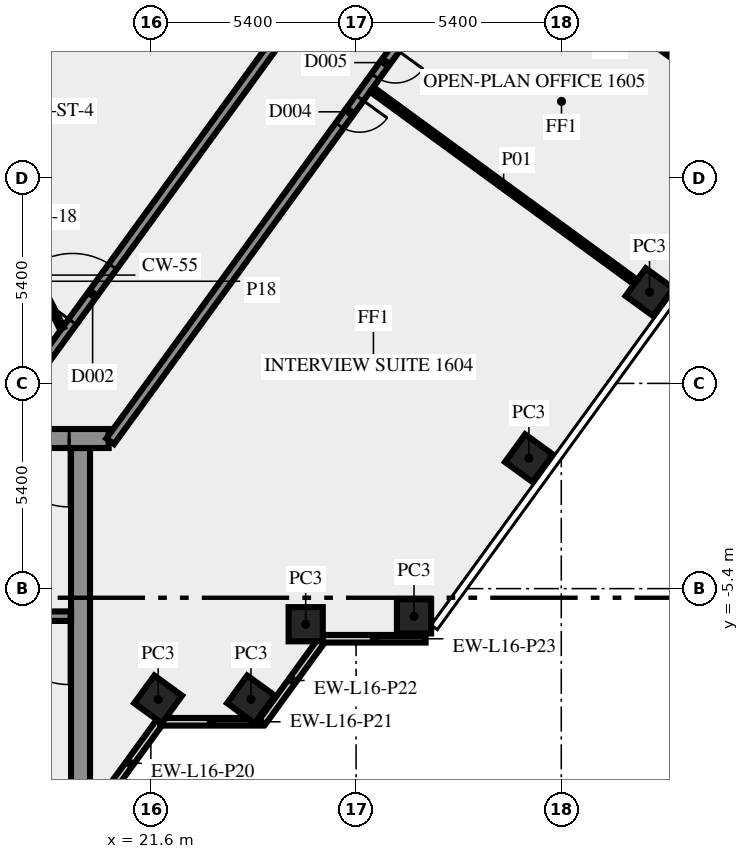
"""IFC4 building model, lengths in metres.
Left out: names, types, materials, properties, quantities, classifications, styles, units other than length and angle.
Written with IfcOpenShell. Run it as: python <this file> out.ifc"""

import sys

from ifc_helpers import new_model, si_unit, direction, frame, frame_2d, origin, origin_2d, place, context, subcontext, project, spatial, rectangle, extrude, element, fill, save


model = new_model("IFC4")
c1 = context("Model", 3, precision=1e-05, world=origin(), true_north=direction((0.0, 1.0)))
c2 = subcontext(c1, "Body", "Model", "MODEL_VIEW")
j1 = project(units=[si_unit("LENGTHUNIT", "METRE"), si_unit("PLANEANGLEUNIT", "RADIAN")], contexts=[c1])
p1 = place(None, origin())
s1 = spatial("IfcSite", under=j1, at=p1, CompositionType="ELEMENT")
p2 = place(p1, origin())
s2 = spatial("IfcBuilding", under=s1, at=p2, CompositionType="ELEMENT")
p3 = place(p2, frame((0.0, 0.0, 71.0)))
s3 = spatial("IfcBuildingStorey", under=s2, at=p3, CompositionType="ELEMENT", Elevation=71.0)
for number, where, z_axis, x_axis in (
    (1, (21.792, -8.315, 0.0), (0.0, 0.0, 1.0), (0.588, 0.809, 0.0)),
    (2, (24.235, -8.315, 0.0), (0.0, 0.0, 1.0), (0.588, 0.809, 0.0)),
    (3, (25.674, -6.337, 0.0), (0.0, 0.0, 1.0), (1.0, 0.0, 0.0)),
    (4, (28.525, -6.13, 0.0), (0.0, 0.0, 1.0), (1.0, 0.0, 0.0)),
    (5, (31.548, -1.969, 0.0), (0.0, 0.0, 1.0), (0.588, 0.809, 0.0)),
    (6, (34.722, 2.4, 0.0), (0.0, 0.0, 1.0), (0.588, 0.809, 0.0)),
):
    element("IfcColumn", number, at=place(p3, frame(where, z_axis=z_axis, x_axis=x_axis)), inside=s3, PredefinedType="COLUMN", context=c2, shape_type="SweptSolid", body=[
        extrude(rectangle(XDim=0.9, YDim=0.9, at=origin_2d()), origin(), (0.0, 0.0, 1.0), 3.65),
    ])
p4 = place(p3, frame((20.253, -11.083, 0.0), z_axis=(0.0, 0.0, 1.0), x_axis=(0.587766567315, 0.809030569476, 0.0)))
e7 = element("IfcWall", 7, at=p4, inside=s3, PredefinedType="SOLIDWALL", context=c2, shape_type="SweptSolid", body=[
    extrude(rectangle(XDim=2.688, YDim=0.2, at=frame_2d((1.344, 0.0))), origin(), (0.0, 0.0, 1.0), 3.65),
])
p5 = place(p3, frame((21.843, -8.904, 0.0), z_axis=(0.0, 0.0, 1.0), x_axis=(1.0, 0.0, 0.0)))
e8 = element("IfcWall", 8, at=p5, inside=s3, PredefinedType="SOLIDWALL", context=c2, shape_type="SweptSolid", body=[
    extrude(rectangle(XDim=2.7, YDim=0.2, at=frame_2d((1.35, 0.0))), origin(), (0.0, 0.0, 1.0), 3.65),
])
p6 = place(p3, frame((24.533, -8.909, 0.0), z_axis=(0.0, 0.0, 1.0), x_axis=(0.587720002413, 0.809064397168, 0.0)))
e9 = element("IfcWall", 9, at=p6, inside=s3, PredefinedType="SOLIDWALL", context=c2, shape_type="SweptSolid", body=[
    extrude(rectangle(XDim=2.7, YDim=0.2, at=frame_2d((1.35, 0.0))), origin(), (0.0, 0.0, 1.0), 3.65),
])
p7 = place(p3, frame((26.13, -6.719, 0.0), z_axis=(0.0, 0.0, 1.0), x_axis=(1.0, 0.0, 0.0)))
e10 = element("IfcWall", 10, at=p7, inside=s3, PredefinedType="SOLIDWALL", context=c2, shape_type="SweptSolid", body=[
    extrude(rectangle(XDim=2.7, YDim=0.2, at=frame_2d((1.35, 0.0))), origin(), (0.0, 0.0, 1.0), 3.65),
])
p8 = place(p3, frame((19.75, -10.5, 0.0), z_axis=(0.0, 0.0, 1.0), x_axis=(0.0, 1.0, 0.0)))
e11 = element("IfcWall", 11, at=p8, inside=s3, PredefinedType="SHEAR", context=c2, shape_type="SweptSolid", body=[
    extrude(rectangle(XDim=8.8, YDim=0.5, at=frame_2d((4.4, 0.0))), origin(), (0.0, 0.0, 1.0), 3.65),
])
p9 = place(p3, frame((19.5, -6.125, 0.0), z_axis=(0.0, 0.0, 1.0), x_axis=(-1.0, 0.0, 0.0)))
e12 = element("IfcWall", 12, at=p9, inside=s3, PredefinedType="SHEAR", context=c2, shape_type="SweptSolid", body=[
    extrude(rectangle(XDim=8.05, YDim=0.25, at=frame_2d((4.025, 0.0))), origin(), (0.0, 0.0, 1.0), 3.65),
])
p10 = place(p9, frame((0.05, 0.0, 0.0)))
e13 = element("IfcOpeningElement", 13, at=p10, cuts=e12, PredefinedType="OPENING", context=c2, shape_type="SweptSolid", body=[
    extrude(rectangle(XDim=1.8, YDim=2.1, at=frame_2d((0.9, 1.05))), frame((0.0, 0.135, 0.0), z_axis=(0.0, -1.0, 0.0), x_axis=(1.0, 0.0, 0.0)), (0.0, 0.0, 1.0), 0.27),
])
p11 = place(p3, frame((20.49, -1.45, 0.0), z_axis=(0.0, 0.0, 1.0), x_axis=(-1.0, 0.0, 0.0)))
e14 = element("IfcWall", 14, at=p11, inside=s3, PredefinedType="SHEAR", context=c2, shape_type="SweptSolid", body=[
    extrude(rectangle(XDim=40.98, YDim=0.5, at=frame_2d((20.49, 0.0))), origin(), (0.0, 0.0, 1.0), 3.65),
])
p12 = place(p11, frame((38.14, 0.0, 0.0)))
e15 = element("IfcOpeningElement", 15, at=p12, cuts=e14, PredefinedType="OPENING", context=c2, shape_type="SweptSolid", body=[
    extrude(rectangle(XDim=1.8, YDim=2.1, at=frame_2d((0.9, 1.05))), frame((0.0, 0.26, 0.0), z_axis=(0.0, -1.0, 0.0), x_axis=(1.0, 0.0, 0.0)), (0.0, 0.0, 1.0), 0.52),
])
p13 = place(p11, frame((35.89, 0.0, 0.0)))
e16 = element("IfcOpeningElement", 16, at=p13, cuts=e14, PredefinedType="OPENING", context=c2, shape_type="SweptSolid", body=[
    extrude(rectangle(XDim=0.9, YDim=2.1, at=frame_2d((0.45, 1.05))), frame((0.0, 0.26, 0.0), z_axis=(0.0, -1.0, 0.0), x_axis=(1.0, 0.0, 0.0)), (0.0, 0.0, 1.0), 0.52),
])
p14 = place(p11, frame((32.94, 0.0, 0.0)))
e17 = element("IfcOpeningElement", 17, at=p14, cuts=e14, PredefinedType="OPENING", context=c2, shape_type="SweptSolid", body=[
    extrude(rectangle(XDim=0.9, YDim=2.1, at=frame_2d((0.45, 1.05))), frame((0.0, 0.26, 0.0), z_axis=(0.0, -1.0, 0.0), x_axis=(1.0, 0.0, 0.0)), (0.0, 0.0, 1.0), 0.52),
])
p15 = place(p11, frame((21.765, 0.0, 0.0)))
e18 = element("IfcOpeningElement", 18, at=p15, cuts=e14, PredefinedType="OPENING", context=c2, shape_type="SweptSolid", body=[
    extrude(rectangle(XDim=2.0, YDim=2.1, at=frame_2d((1.0, 1.05))), frame((0.0, 0.26, 0.0), z_axis=(0.0, -1.0, 0.0), x_axis=(1.0, 0.0, 0.0)), (0.0, 0.0, 1.0), 0.52),
])
p16 = place(p11, frame((7.14, 0.0, 0.0)))
e19 = element("IfcOpeningElement", 19, at=p16, cuts=e14, PredefinedType="OPENING", context=c2, shape_type="SweptSolid", body=[
    extrude(rectangle(XDim=0.9, YDim=2.1, at=frame_2d((0.45, 1.05))), frame((0.0, 0.26, 0.0), z_axis=(0.0, -1.0, 0.0), x_axis=(1.0, 0.0, 0.0)), (0.0, 0.0, 1.0), 0.52),
])
p17 = place(p11, frame((5.028, 0.0, 0.0)))
e20 = element("IfcOpeningElement", 20, at=p17, cuts=e14, PredefinedType="OPENING", context=c2, shape_type="SweptSolid", body=[
    extrude(rectangle(XDim=0.8, YDim=2.1, at=frame_2d((0.4, 1.05))), frame((0.0, 0.26, 0.0), z_axis=(0.0, -1.0, 0.0), x_axis=(1.0, 0.0, 0.0)), (0.0, 0.0, 1.0), 0.52),
])
p18 = place(p11, frame((3.452, 0.0, 0.0)))
e21 = element("IfcOpeningElement", 21, at=p18, cuts=e14, PredefinedType="OPENING", context=c2, shape_type="SweptSolid", body=[
    extrude(rectangle(XDim=0.8, YDim=2.1, at=frame_2d((0.4, 1.05))), frame((0.0, 0.26, 0.0), z_axis=(0.0, -1.0, 0.0), x_axis=(1.0, 0.0, 0.0)), (0.0, 0.0, 1.0), 0.52),
])
p19 = place(p11, frame((1.04, 0.0, 0.0)))
e22 = element("IfcOpeningElement", 22, at=p19, cuts=e14, PredefinedType="OPENING", context=c2, shape_type="SweptSolid", body=[
    extrude(rectangle(XDim=1.8, YDim=2.1, at=frame_2d((0.9, 1.05))), frame((0.0, 0.26, 0.0), z_axis=(0.0, -1.0, 0.0), x_axis=(1.0, 0.0, 0.0)), (0.0, 0.0, 1.0), 0.52),
])
p20 = place(p3, frame((17.545, -1.125, 0.0), z_axis=(0.0, 0.0, 1.0), x_axis=(0.587786323093, 0.809016216391, 0.0)))
e23 = element("IfcWall", 23, at=p20, inside=s3, PredefinedType="SOLIDWALL", context=c2, shape_type="SweptSolid", body=[
    extrude(rectangle(XDim=33.493, YDim=0.25, at=frame_2d((16.747, 0.0))), origin(), (0.0, 0.0, 1.0), 3.65),
])
p21 = place(p20, frame((27.458, 0.0, 0.0)))
e24 = element("IfcOpeningElement", 24, at=p21, cuts=e23, PredefinedType="OPENING", context=c2, shape_type="SweptSolid", body=[
    extrude(rectangle(XDim=1.8, YDim=2.1, at=frame_2d((0.9, 1.05))), frame((0.0, 0.135, 0.0), z_axis=(0.0, -1.0, 0.0), x_axis=(1.0, 0.0, 0.0)), (0.0, 0.0, 1.0), 0.27),
])
p22 = place(p20, frame((3.392, 0.0, 0.0)))
e25 = element("IfcOpeningElement", 25, at=p22, cuts=e23, PredefinedType="OPENING", context=c2, shape_type="SweptSolid", body=[
    extrude(rectangle(XDim=1.8, YDim=2.1, at=frame_2d((0.9, 1.05))), frame((0.0, 0.135, 0.0), z_axis=(0.0, -1.0, 0.0), x_axis=(1.0, 0.0, 0.0)), (0.0, 0.0, 1.0), 0.27),
])
p23 = place(p20, frame((32.253, 0.0, 0.0)))
e26 = element("IfcOpeningElement", 26, at=p23, cuts=e23, PredefinedType="OPENING", context=c2, shape_type="SweptSolid", body=[
    extrude(rectangle(XDim=0.9, YDim=2.1, at=frame_2d((0.45, 1.05))), frame((0.0, 0.135, 0.0), z_axis=(0.0, -1.0, 0.0), x_axis=(1.0, 0.0, 0.0)), (0.0, 0.0, 1.0), 0.27),
])
p24 = place(p3, frame((43.467, 30.045, 0.0), z_axis=(0.0, 0.0, 1.0), x_axis=(-0.587784726077, -0.809017376692, 0.0)))
e27 = element("IfcWall", 27, at=p24, inside=s3, PredefinedType="SOLIDWALL", context=c2, shape_type="SweptSolid", body=[
    extrude(rectangle(XDim=39.02, YDim=0.25, at=frame_2d((19.51, 0.0))), origin(), (0.0, 0.0, 1.0), 3.65),
])
p25 = place(p24, frame((26.254, 0.0, 0.0)))
e28 = element("IfcOpeningElement", 28, at=p25, cuts=e27, PredefinedType="OPENING", context=c2, shape_type="SweptSolid", body=[
    extrude(rectangle(XDim=0.9, YDim=2.1, at=frame_2d((0.45, 1.05))), frame((0.0, 0.135, 0.0), z_axis=(0.0, -1.0, 0.0), x_axis=(1.0, 0.0, 0.0)), (0.0, 0.0, 1.0), 0.27),
])
p26 = place(p24, frame((2.205, 0.0, 0.0)))
e29 = element("IfcOpeningElement", 29, at=p26, cuts=e27, PredefinedType="OPENING", context=c2, shape_type="SweptSolid", body=[
    extrude(rectangle(XDim=0.9, YDim=2.1, at=frame_2d((0.45, 1.05))), frame((0.0, 0.135, 0.0), z_axis=(0.0, -1.0, 0.0), x_axis=(1.0, 0.0, 0.0)), (0.0, 0.0, 1.0), 0.27),
])
p27 = place(p24, frame((27.855, 0.0, 0.0)))
e30 = element("IfcOpeningElement", 30, at=p27, cuts=e27, PredefinedType="OPENING", context=c2, shape_type="SweptSolid", body=[
    extrude(rectangle(XDim=0.9, YDim=2.1, at=frame_2d((0.45, 1.05))), frame((0.0, 0.135, 0.0), z_axis=(0.0, -1.0, 0.0), x_axis=(1.0, 0.0, 0.0)), (0.0, 0.0, 1.0), 0.27),
])
p28 = place(p24, frame((18.155, 0.0, 0.0)))
e31 = element("IfcOpeningElement", 31, at=p28, cuts=e27, PredefinedType="OPENING", context=c2, shape_type="SweptSolid", body=[
    extrude(rectangle(XDim=0.9, YDim=2.1, at=frame_2d((0.45, 1.05))), frame((0.0, 0.135, 0.0), z_axis=(0.0, -1.0, 0.0), x_axis=(1.0, 0.0, 0.0)), (0.0, 0.0, 1.0), 0.27),
])
p29 = place(p24, frame((19.755, 0.0, 0.0)))
e32 = element("IfcOpeningElement", 32, at=p29, cuts=e27, PredefinedType="OPENING", context=c2, shape_type="SweptSolid", body=[
    extrude(rectangle(XDim=0.9, YDim=2.1, at=frame_2d((0.45, 1.05))), frame((0.0, 0.135, 0.0), z_axis=(0.0, -1.0, 0.0), x_axis=(1.0, 0.0, 0.0)), (0.0, 0.0, 1.0), 0.27),
])
p30 = place(p24, frame((0.224, 0.0, 0.0)))
e33 = element("IfcOpeningElement", 33, at=p30, cuts=e27, PredefinedType="OPENING", context=c2, shape_type="SweptSolid", body=[
    extrude(rectangle(XDim=0.9, YDim=2.1, at=frame_2d((0.45, 1.05))), frame((0.0, 0.135, 0.0), z_axis=(0.0, -1.0, 0.0), x_axis=(1.0, 0.0, 0.0)), (0.0, 0.0, 1.0), 0.27),
])
p31 = place(p3, frame((27.413, 7.735, 0.0), z_axis=(0.0, 0.0, 1.0), x_axis=(0.807664804385, -0.589641894507, 0.0)))
e34 = element("IfcWall", 34, at=p31, inside=s3, PredefinedType="PARTITIONING", context=c2, shape_type="SweptSolid", body=[
    extrude(rectangle(XDim=8.594, YDim=0.15, at=frame_2d((4.297, 0.0))), origin(), (0.0, 0.0, 1.0), 3.65),
])
p32 = place(p3, frame((37.516, 7.02, 0.0), z_axis=(0.0, 0.0, 1.0), x_axis=(-0.809002556908, 0.587805123248, 0.0)))
e35 = element("IfcWall", 35, at=p32, inside=s3, PredefinedType="PARTITIONING", context=c2, shape_type="SweptSolid", body=[
    extrude(rectangle(XDim=8.595, YDim=0.12, at=frame_2d((4.297, 0.0))), origin(), (0.0, 0.0, 1.0), 3.65),
])
p33 = place(p3, frame((32.174, 14.288, 0.0), z_axis=(0.0, 0.0, 1.0), x_axis=(0.807664588563, -0.589642190131, 0.0)))
e36 = element("IfcWall", 36, at=p33, inside=s3, PredefinedType="PARTITIONING", context=c2, shape_type="SweptSolid", body=[
    extrude(rectangle(XDim=9.55, YDim=0.12, at=frame_2d((4.775, 0.0))), origin(), (0.0, 0.0, 1.0), 2.75),
])
p34 = place(p3, frame((18.0, 3.925, 0.0), z_axis=(0.0, 0.0, 1.0), x_axis=(0.453950796792, -0.891026752736, 0.0)))
e37 = element("IfcWall", 37, at=p34, inside=s3, PredefinedType="PARTITIONING", context=c2, shape_type="SweptSolid", body=[
    extrude(rectangle(XDim=2.778, YDim=0.12, at=frame_2d((1.389, 0.0))), origin(), (0.0, 0.0, 1.0), 3.65),
])
p35 = place(p10, origin())
e38 = element("IfcDoor", 38, at=p35, inside=s3, OperationType="DOUBLE_DOOR_SINGLE_SWING", PredefinedType="DOOR", context=c2, shape_type="SweptSolid", body=[
    extrude(rectangle(XDim=1.8, YDim=2.1, at=frame_2d((0.9, 1.05))), frame((0.0, 0.025, 0.0), z_axis=(0.0, -1.0, 0.0), x_axis=(1.0, 0.0, 0.0)), (0.0, 0.0, 1.0), 0.05),
])
fill(e13, e38)
p36 = place(p19, origin())
e39 = element("IfcDoor", 39, at=p36, inside=s3, OperationType="DOUBLE_DOOR_SINGLE_SWING", PredefinedType="DOOR", context=c2, shape_type="SweptSolid", body=[
    extrude(rectangle(XDim=1.8, YDim=2.1, at=frame_2d((0.9, 1.05))), frame((0.0, 0.025, 0.0), z_axis=(0.0, -1.0, 0.0), x_axis=(1.0, 0.0, 0.0)), (0.0, 0.0, 1.0), 0.05),
])
fill(e22, e39)
p37 = place(p25, origin())
e40 = element("IfcDoor", 40, at=p37, inside=s3, OperationType="SINGLE_SWING_RIGHT", PredefinedType="DOOR", context=c2, shape_type="SweptSolid", body=[
    extrude(rectangle(XDim=0.9, YDim=2.1, at=frame_2d((0.45, 1.05))), frame((0.0, 0.025, 0.0), z_axis=(0.0, -1.0, 0.0), x_axis=(1.0, 0.0, 0.0)), (0.0, 0.0, 1.0), 0.05),
])
fill(e28, e40)
p38 = place(p22, origin())
e41 = element("IfcDoor", 41, at=p38, inside=s3, OperationType="DOUBLE_DOOR_SINGLE_SWING", PredefinedType="DOOR", context=c2, shape_type="SweptSolid", body=[
    extrude(rectangle(XDim=1.8, YDim=2.1, at=frame_2d((0.9, 1.05))), frame((0.0, 0.025, 0.0), z_axis=(0.0, -1.0, 0.0), x_axis=(1.0, 0.0, 0.0)), (0.0, 0.0, 1.0), 0.05),
])
fill(e25, e41)
p39 = place(p27, origin())
e42 = element("IfcDoor", 42, at=p39, inside=s3, OperationType="SINGLE_SWING_LEFT", PredefinedType="DOOR", context=c2, shape_type="SweptSolid", body=[
    extrude(rectangle(XDim=0.9, YDim=2.1, at=frame_2d((0.45, 1.05))), frame((0.0, 0.025, 0.0), z_axis=(0.0, -1.0, 0.0), x_axis=(1.0, 0.0, 0.0)), (0.0, 0.0, 1.0), 0.05),
])
fill(e30, e42)
save(model, sys.argv[1])
